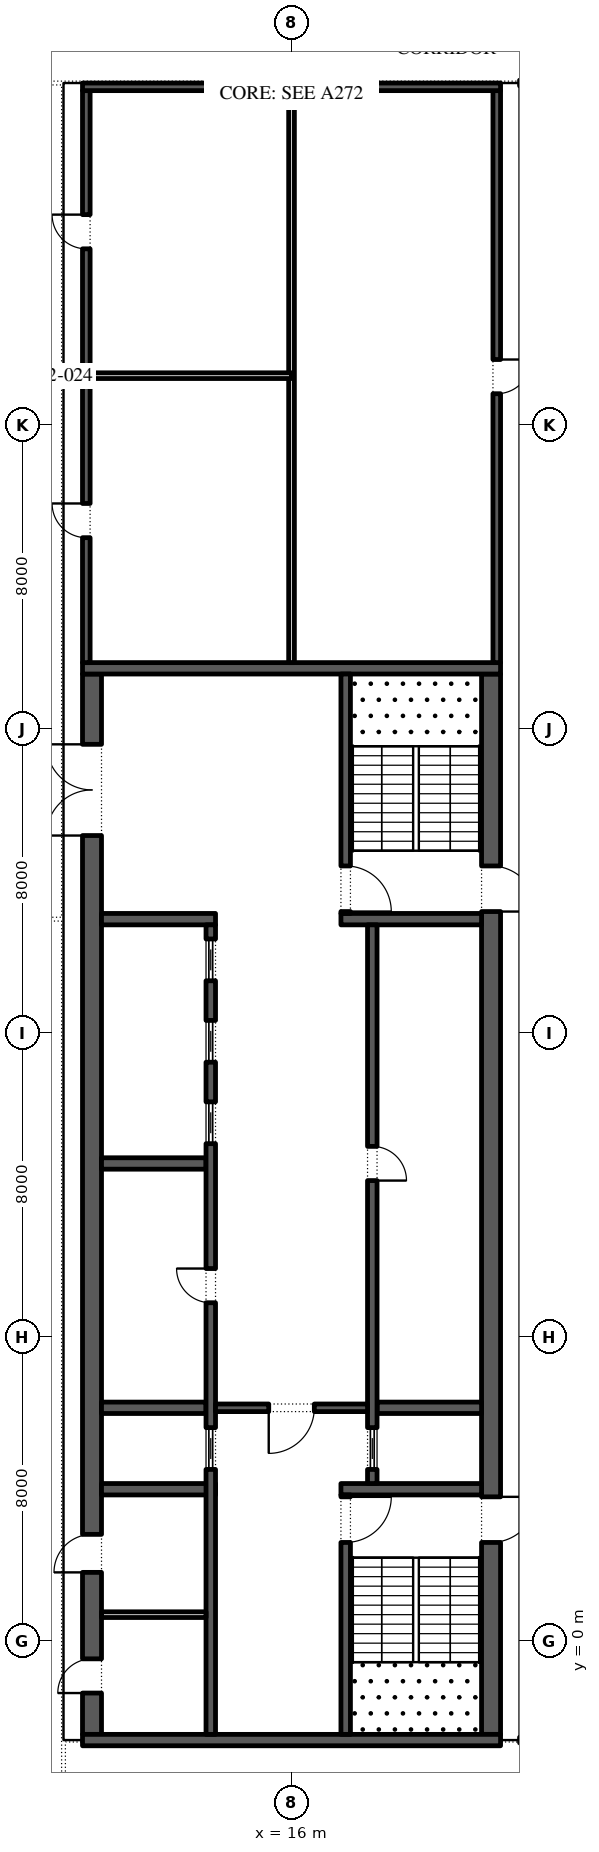
"""IFC4 building model, lengths in metres.
Left out: names, types, materials, properties, quantities, classifications, styles, units other than length and angle.
Written with IfcOpenShell. Run it as: python <this file> out.ifc"""

import sys

from ifc_helpers import new_model, si_unit, direction, frame, frame_2d, origin, place, context, subcontext, project, spatial, rectangle, extrude, element, fill, save


model = new_model("IFC4")
c1 = context("Model", 3, precision=1e-05, world=origin(), true_north=direction((0.0, 1.0)))
c2 = subcontext(c1, "Body", "Model", "MODEL_VIEW")
j1 = project(units=[si_unit("LENGTHUNIT", "METRE"), si_unit("PLANEANGLEUNIT", "RADIAN")], contexts=[c1])
p1 = place(None, origin())
s1 = spatial("IfcSite", under=j1, at=p1, CompositionType="ELEMENT")
p2 = place(p1, origin())
s2 = spatial("IfcBuilding", under=s1, at=p2, CompositionType="ELEMENT")
p3 = place(p2, frame((0.0, 0.0, 317.4)))
s3 = spatial("IfcBuildingStorey", under=s2, at=p3, CompositionType="ELEMENT", Elevation=317.4)
p4 = place(p3, frame((21.25, -2.45, 0.0), z_axis=(0.0, 0.0, 1.0), x_axis=(0.0, 1.0, 0.0)))
e1 = element("IfcWall", 1, at=p4, inside=s3, PredefinedType="SHEAR", context=c2, shape_type="SweptSolid", body=[
    extrude(rectangle(XDim=27.9, YDim=0.5, at=frame_2d((13.95, 0.0))), origin(), (0.0, 0.0, 1.0), 4.0),
])
p5 = place(p4, frame((5.05, 0.0, 0.0)))
e2 = element("IfcOpeningElement", 2, at=p5, cuts=e1, PredefinedType="OPENING", context=c2, shape_type="SweptSolid", body=[
    extrude(rectangle(XDim=1.2, YDim=2.1, at=frame_2d((0.6, 1.05))), frame((0.0, 0.26, 0.0), z_axis=(0.0, -1.0, 0.0), x_axis=(1.0, 0.0, 0.0)), (0.0, 0.0, 1.0), 0.52),
])
p6 = place(p4, frame((21.65, 0.0, 0.0)))
e3 = element("IfcOpeningElement", 3, at=p6, cuts=e1, PredefinedType="OPENING", context=c2, shape_type="SweptSolid", body=[
    extrude(rectangle(XDim=1.2, YDim=2.1, at=frame_2d((0.6, 1.05))), frame((0.0, 0.26, 0.0), z_axis=(0.0, -1.0, 0.0), x_axis=(1.0, 0.0, 0.0)), (0.0, 0.0, 1.0), 0.52),
])
p7 = place(p3, frame((10.75, -2.45, 0.0), z_axis=(0.0, 0.0, 1.0), x_axis=(0.0, 1.0, 0.0)))
e4 = element("IfcWall", 4, at=p7, inside=s3, PredefinedType="SHEAR", context=c2, shape_type="SweptSolid", body=[
    extrude(rectangle(XDim=27.9, YDim=0.5, at=frame_2d((13.95, 0.0))), origin(), (0.0, 0.0, 1.0), 4.0),
])
p8 = place(p7, frame((23.65, 0.0, 0.0)))
e5 = element("IfcOpeningElement", 5, at=p8, cuts=e4, PredefinedType="OPENING", context=c2, shape_type="SweptSolid", body=[
    extrude(rectangle(XDim=2.4, YDim=2.1, at=frame_2d((1.2, 1.05))), frame((0.0, 0.26, 0.0), z_axis=(0.0, -1.0, 0.0), x_axis=(1.0, 0.0, 0.0)), (0.0, 0.0, 1.0), 0.52),
])
p9 = place(p7, frame((1.087, 0.0, 0.0)))
e6 = element("IfcOpeningElement", 6, at=p9, cuts=e4, PredefinedType="OPENING", context=c2, shape_type="SweptSolid", body=[
    extrude(rectangle(XDim=0.9, YDim=2.1, at=frame_2d((0.45, 1.05))), frame((0.0, 0.26, 0.0), z_axis=(0.0, -1.0, 0.0), x_axis=(1.0, 0.0, 0.0)), (0.0, 0.0, 1.0), 0.52),
])
p10 = place(p7, frame((4.262, 0.0, 0.0)))
e7 = element("IfcOpeningElement", 7, at=p10, cuts=e4, PredefinedType="OPENING", context=c2, shape_type="SweptSolid", body=[
    extrude(rectangle(XDim=1.0, YDim=2.1, at=frame_2d((0.5, 1.05))), frame((0.0, 0.26, 0.0), z_axis=(0.0, -1.0, 0.0), x_axis=(1.0, 0.0, 0.0)), (0.0, 0.0, 1.0), 0.52),
])
for number, where, z_axis, x_axis in (
    (8, (10.5, -2.6, 0.0), (0.0, 0.0, 1.0), (1.0, 0.0, 0.0)),
    (9, (10.5, 25.6, 0.0), (0.0, 0.0, 1.0), (1.0, 0.0, 0.0)),
):
    element("IfcWall", number, at=place(p3, frame(where, z_axis=z_axis, x_axis=x_axis)), inside=s3, PredefinedType="SHEAR", context=c2, shape_type="SweptSolid", body=[
        extrude(rectangle(XDim=11.0, YDim=0.3, at=frame_2d((5.5, 0.0))), origin(), (0.0, 0.0, 1.0), 4.0),
    ])
p11 = place(p3, frame((17.3, 4.0, 0.0), z_axis=(0.0, 0.0, 1.0), x_axis=(1.0, 0.0, 0.0)))
e10 = element("IfcWall", 10, at=p11, inside=s3, PredefinedType="SHEAR", context=c2, shape_type="SweptSolid", body=[
    extrude(rectangle(XDim=3.7, YDim=0.3, at=frame_2d((1.85, 0.0))), origin(), (0.0, 0.0, 1.0), 4.0),
])
p12 = place(p3, frame((17.425, -2.45, 0.0), z_axis=(0.0, 0.0, 1.0), x_axis=(0.0, 1.0, 0.0)))
e11 = element("IfcWall", 11, at=p12, inside=s3, PredefinedType="SHEAR", context=c2, shape_type="SweptSolid", body=[
    extrude(rectangle(XDim=6.3, YDim=0.25, at=frame_2d((3.15, 0.0))), origin(), (0.0, 0.0, 1.0), 4.0),
])
p13 = place(p12, frame((5.05, 0.0, 0.0)))
e12 = element("IfcOpeningElement", 12, at=p13, cuts=e11, PredefinedType="OPENING", context=c2, shape_type="SweptSolid", body=[
    extrude(rectangle(XDim=1.2, YDim=2.1, at=frame_2d((0.6, 1.05))), frame((0.0, 0.135, 0.0), z_axis=(0.0, -1.0, 0.0), x_axis=(1.0, 0.0, 0.0)), (0.0, 0.0, 1.0), 0.27),
])
p14 = place(p3, frame((17.3, 19.0, 0.0), z_axis=(0.0, 0.0, 1.0), x_axis=(1.0, 0.0, 0.0)))
e13 = element("IfcWall", 13, at=p14, inside=s3, PredefinedType="SHEAR", context=c2, shape_type="SweptSolid", body=[
    extrude(rectangle(XDim=3.7, YDim=0.3, at=frame_2d((1.85, 0.0))), origin(), (0.0, 0.0, 1.0), 4.0),
])
p15 = place(p3, frame((17.425, 19.15, 0.0), z_axis=(0.0, 0.0, 1.0), x_axis=(0.0, 1.0, 0.0)))
e14 = element("IfcWall", 14, at=p15, inside=s3, PredefinedType="SHEAR", context=c2, shape_type="SweptSolid", body=[
    extrude(rectangle(XDim=6.3, YDim=0.25, at=frame_2d((3.15, 0.0))), origin(), (0.0, 0.0, 1.0), 4.0),
])
p16 = place(p15, frame((0.05, 0.0, 0.0)))
e15 = element("IfcOpeningElement", 15, at=p16, cuts=e14, PredefinedType="OPENING", context=c2, shape_type="SweptSolid", body=[
    extrude(rectangle(XDim=1.2, YDim=2.1, at=frame_2d((0.6, 1.05))), frame((0.0, 0.135, 0.0), z_axis=(0.0, -1.0, 0.0), x_axis=(1.0, 0.0, 0.0)), (0.0, 0.0, 1.0), 0.27),
])
p17 = place(p3, frame((18.25, 6.143, 0.0), z_axis=(0.0, 0.0, 1.0), x_axis=(1.0, 0.0, 0.0)))
e16 = element("IfcWall", 16, at=p17, inside=s3, PredefinedType="SHEAR", context=c2, shape_type="SweptSolid", body=[
    extrude(rectangle(XDim=2.75, YDim=0.3, at=frame_2d((1.375, 0.0))), origin(), (0.0, 0.0, 1.0), 4.0),
])
p18 = place(p3, frame((18.125, 4.15, 0.0), z_axis=(0.0, 0.0, 1.0), x_axis=(0.0, 1.0, 0.0)))
e17 = element("IfcWall", 17, at=p18, inside=s3, PredefinedType="SHEAR", context=c2, shape_type="SweptSolid", body=[
    extrude(rectangle(XDim=14.7, YDim=0.25, at=frame_2d((7.35, 0.0))), origin(), (0.0, 0.0, 1.0), 4.0),
])
p19 = place(p18, frame((7.971, 0.0, 0.0)))
e18 = element("IfcOpeningElement", 18, at=p19, cuts=e17, PredefinedType="OPENING", context=c2, shape_type="SweptSolid", body=[
    extrude(rectangle(XDim=0.9, YDim=2.1, at=frame_2d((0.45, 1.05))), frame((0.0, 0.135, 0.0), z_axis=(0.0, -1.0, 0.0), x_axis=(1.0, 0.0, 0.0)), (0.0, 0.0, 1.0), 0.27),
])
p20 = place(p18, frame((0.371, 0.0, 0.0)))
e19 = element("IfcOpeningElement", 19, at=p20, cuts=e17, PredefinedType="OPENING", context=c2, shape_type="SweptSolid", body=[
    extrude(rectangle(XDim=1.1, YDim=2.1, at=frame_2d((0.55, 1.05))), frame((0.0, 0.135, 0.0), z_axis=(0.0, -1.0, 0.0), x_axis=(1.0, 0.0, 0.0)), (0.0, 0.0, 1.0), 0.27),
])
p21 = place(p3, frame((11.0, 4.0, 0.0), z_axis=(0.0, 0.0, 1.0), x_axis=(1.0, 0.0, 0.0)))
e20 = element("IfcWall", 20, at=p21, inside=s3, PredefinedType="SHEAR", context=c2, shape_type="SweptSolid", body=[
    extrude(rectangle(XDim=3.0, YDim=0.3, at=frame_2d((1.5, 0.0))), origin(), (0.0, 0.0, 1.0), 4.0),
])
for number, where, z_axis, x_axis in (
    (21, (11.0, 6.143, 0.0), (0.0, 0.0, 1.0), (1.0, 0.0, 0.0)),
    (22, (11.0, 12.571, 0.0), (0.0, 0.0, 1.0), (1.0, 0.0, 0.0)),
):
    element("IfcWall", number, at=place(p3, frame(where, z_axis=z_axis, x_axis=x_axis)), inside=s3, PredefinedType="SHEAR", context=c2, shape_type="SweptSolid", body=[
        extrude(rectangle(XDim=2.75, YDim=0.3, at=frame_2d((1.375, 0.0))), origin(), (0.0, 0.0, 1.0), 4.0),
    ])
p22 = place(p3, frame((11.0, 19.0, 0.0), z_axis=(0.0, 0.0, 1.0), x_axis=(1.0, 0.0, 0.0)))
e23 = element("IfcWall", 23, at=p22, inside=s3, PredefinedType="SHEAR", context=c2, shape_type="SweptSolid", body=[
    extrude(rectangle(XDim=3.0, YDim=0.3, at=frame_2d((1.5, 0.0))), origin(), (0.0, 0.0, 1.0), 4.0),
])
p23 = place(p3, frame((13.875, -2.45, 0.0), z_axis=(0.0, 0.0, 1.0), x_axis=(0.0, 1.0, 0.0)))
e24 = element("IfcWall", 24, at=p23, inside=s3, PredefinedType="SHEAR", context=c2, shape_type="SweptSolid", body=[
    extrude(rectangle(XDim=21.3, YDim=0.25, at=frame_2d((10.65, 0.0))), origin(), (0.0, 0.0, 1.0), 4.0),
])
p24 = place(p23, frame((11.357, 0.0, 0.0)))
e25 = element("IfcOpeningElement", 25, at=p24, cuts=e24, PredefinedType="OPENING", context=c2, shape_type="SweptSolid", body=[
    extrude(rectangle(XDim=0.9, YDim=2.1, at=frame_2d((0.45, 1.05))), frame((0.0, 0.135, 0.0), z_axis=(0.0, -1.0, 0.0), x_axis=(1.0, 0.0, 0.0)), (0.0, 0.0, 1.0), 0.27),
])
p25 = place(p23, frame((6.971, 0.0, 0.0)))
e26 = element("IfcOpeningElement", 26, at=p25, cuts=e24, PredefinedType="OPENING", context=c2, shape_type="SweptSolid", body=[
    extrude(rectangle(XDim=1.1, YDim=2.1, at=frame_2d((0.55, 1.05))), frame((0.0, 0.135, 0.0), z_axis=(0.0, -1.0, 0.0), x_axis=(1.0, 0.0, 0.0)), (0.0, 0.0, 1.0), 0.27),
])
p26 = place(p23, frame((15.543, 0.0, 0.0)))
e27 = element("IfcOpeningElement", 27, at=p26, cuts=e24, PredefinedType="OPENING", context=c2, shape_type="SweptSolid", body=[
    extrude(rectangle(XDim=1.1, YDim=2.1, at=frame_2d((0.55, 1.05))), frame((0.0, 0.135, 0.0), z_axis=(0.0, -1.0, 0.0), x_axis=(1.0, 0.0, 0.0)), (0.0, 0.0, 1.0), 0.27),
])
p27 = place(p23, frame((17.686, 0.0, 0.0)))
e28 = element("IfcOpeningElement", 28, at=p27, cuts=e24, PredefinedType="OPENING", context=c2, shape_type="SweptSolid", body=[
    extrude(rectangle(XDim=1.1, YDim=2.1, at=frame_2d((0.55, 1.05))), frame((0.0, 0.135, 0.0), z_axis=(0.0, -1.0, 0.0), x_axis=(1.0, 0.0, 0.0)), (0.0, 0.0, 1.0), 0.27),
])
p28 = place(p23, frame((19.829, 0.0, 0.0)))
e29 = element("IfcOpeningElement", 29, at=p28, cuts=e24, PredefinedType="OPENING", context=c2, shape_type="SweptSolid", body=[
    extrude(rectangle(XDim=1.1, YDim=2.1, at=frame_2d((0.55, 1.05))), frame((0.0, 0.135, 0.0), z_axis=(0.0, -1.0, 0.0), x_axis=(1.0, 0.0, 0.0)), (0.0, 0.0, 1.0), 0.27),
])
p29 = place(p3, frame((14.0, 6.143, 0.0), z_axis=(0.0, 0.0, 1.0), x_axis=(1.0, 0.0, 0.0)))
e30 = element("IfcWall", 30, at=p29, inside=s3, PredefinedType="SHEAR", context=c2, shape_type="SweptSolid", body=[
    extrude(rectangle(XDim=4.0, YDim=0.2, at=frame_2d((2.0, 0.0))), origin(), (0.0, 0.0, 1.0), 4.0),
])
p30 = place(p29, frame((1.4, 0.0, 0.0)))
e31 = element("IfcOpeningElement", 31, at=p30, cuts=e30, PredefinedType="OPENING", context=c2, shape_type="SweptSolid", body=[
    extrude(rectangle(XDim=1.2, YDim=2.1, at=frame_2d((0.6, 1.05))), frame((0.0, 0.11, 0.0), z_axis=(0.0, -1.0, 0.0), x_axis=(1.0, 0.0, 0.0)), (0.0, 0.0, 1.0), 0.22),
])
p31 = place(p3, frame((11.0, 0.7, 0.0), z_axis=(0.0, 0.0, 1.0), x_axis=(1.0, 0.0, 0.0)))
e32 = element("IfcWall", 32, at=p31, inside=s3, PredefinedType="PARTITIONING", context=c2, shape_type="SweptSolid", body=[
    extrude(rectangle(XDim=2.75, YDim=0.15, at=frame_2d((1.375, 0.0))), origin(), (0.0, 0.0, 1.0), 4.0),
])
p32 = place(p3, frame((21.4, 25.75, 0.0), z_axis=(0.0, 0.0, 1.0), x_axis=(0.0, 1.0, 0.0)))
e33 = element("IfcWall", 33, at=p32, inside=s3, PredefinedType="SHEAR", context=c2, shape_type="SweptSolid", body=[
    extrude(rectangle(XDim=15.05, YDim=0.2, at=frame_2d((7.525, 0.0))), origin(), (0.0, 0.0, 1.0), 4.0),
])
p33 = place(p32, frame((7.075, 0.0, 0.0)))
e34 = element("IfcOpeningElement", 34, at=p33, cuts=e33, PredefinedType="OPENING", context=c2, shape_type="SweptSolid", body=[
    extrude(rectangle(XDim=0.9, YDim=2.1, at=frame_2d((0.45, 1.05))), frame((0.0, 0.11, 0.0), z_axis=(0.0, -1.0, 0.0), x_axis=(1.0, 0.0, 0.0)), (0.0, 0.0, 1.0), 0.22),
])
p34 = place(p3, frame((10.6, 25.75, 0.0), z_axis=(0.0, 0.0, 1.0), x_axis=(0.0, 1.0, 0.0)))
e35 = element("IfcWall", 35, at=p34, inside=s3, PredefinedType="SHEAR", context=c2, shape_type="SweptSolid", body=[
    extrude(rectangle(XDim=15.05, YDim=0.2, at=frame_2d((7.525, 0.0))), origin(), (0.0, 0.0, 1.0), 4.0),
])
p35 = place(p34, frame((3.288, 0.0, 0.0)))
e36 = element("IfcOpeningElement", 36, at=p35, cuts=e35, PredefinedType="OPENING", context=c2, shape_type="SweptSolid", body=[
    extrude(rectangle(XDim=0.9, YDim=2.1, at=frame_2d((0.45, 1.05))), frame((0.0, 0.11, 0.0), z_axis=(0.0, -1.0, 0.0), x_axis=(1.0, 0.0, 0.0)), (0.0, 0.0, 1.0), 0.22),
])
p36 = place(p34, frame((10.887, 0.0, 0.0)))
e37 = element("IfcOpeningElement", 37, at=p36, cuts=e35, PredefinedType="OPENING", context=c2, shape_type="SweptSolid", body=[
    extrude(rectangle(XDim=0.9, YDim=2.1, at=frame_2d((0.45, 1.05))), frame((0.0, 0.11, 0.0), z_axis=(0.0, -1.0, 0.0), x_axis=(1.0, 0.0, 0.0)), (0.0, 0.0, 1.0), 0.22),
])
p37 = place(p3, frame((10.5, 40.9, 0.0), z_axis=(0.0, 0.0, 1.0), x_axis=(1.0, 0.0, 0.0)))
e38 = element("IfcWall", 38, at=p37, inside=s3, PredefinedType="SHEAR", context=c2, shape_type="SweptSolid", body=[
    extrude(rectangle(XDim=11.0, YDim=0.2, at=frame_2d((5.5, 0.0))), origin(), (0.0, 0.0, 1.0), 4.0),
])
p38 = place(p3, frame((16.0, 25.75, 0.0), z_axis=(0.0, 0.0, 1.0), x_axis=(0.0, 1.0, 0.0)))
e39 = element("IfcWall", 39, at=p38, inside=s3, PredefinedType="PARTITIONING", context=c2, shape_type="SweptSolid", body=[
    extrude(rectangle(XDim=15.05, YDim=0.15, at=frame_2d((7.525, 0.0))), origin(), (0.0, 0.0, 1.0), 4.0),
])
p39 = place(p3, frame((10.7, 33.3, 0.0), z_axis=(0.0, 0.0, 1.0), x_axis=(1.0, 0.0, 0.0)))
e40 = element("IfcWall", 40, at=p39, inside=s3, PredefinedType="PARTITIONING", context=c2, shape_type="SweptSolid", body=[
    extrude(rectangle(XDim=5.3, YDim=0.15, at=frame_2d((2.65, 0.0))), origin(), (0.0, 0.0, 1.0), 4.0),
])
p40 = place(p19, frame((0.9, -0.2, 0.0), z_axis=(0.0, 0.0, 1.0), x_axis=(-1.0, 0.0, 0.0)))
e41 = element("IfcDoor", 41, at=p40, inside=s3, OperationType="SINGLE_SWING_LEFT", PredefinedType="DOOR", context=c2, shape_type="SweptSolid", body=[
    extrude(rectangle(XDim=0.9, YDim=2.1, at=frame_2d((0.45, 1.05))), frame((0.0, -0.075, 0.0), z_axis=(0.0, -1.0, 0.0), x_axis=(1.0, 0.0, 0.0)), (0.0, 0.0, 1.0), 0.05),
])
fill(e18, e41)
p41 = place(p20, origin())
e42 = element("IfcDoor", 42, at=p41, inside=s3, OperationType="SLIDING_TO_LEFT", PredefinedType="DOOR", context=c2, shape_type="SweptSolid", body=[
    extrude(rectangle(XDim=1.1, YDim=2.1, at=frame_2d((0.55, 1.05))), frame((0.0, 0.025, 0.0), z_axis=(0.0, -1.0, 0.0), x_axis=(1.0, 0.0, 0.0)), (0.0, 0.0, 1.0), 0.05),
])
fill(e19, e42)
p42 = place(p24, origin())
e43 = element("IfcDoor", 43, at=p42, inside=s3, OperationType="SINGLE_SWING_LEFT", PredefinedType="DOOR", context=c2, shape_type="SweptSolid", body=[
    extrude(rectangle(XDim=0.9, YDim=2.1, at=frame_2d((0.45, 1.05))), frame((0.0, 0.125, 0.0), z_axis=(0.0, -1.0, 0.0), x_axis=(1.0, 0.0, 0.0)), (0.0, 0.0, 1.0), 0.05),
])
fill(e25, e43)
p43 = place(p25, origin())
e44 = element("IfcDoor", 44, at=p43, inside=s3, OperationType="SLIDING_TO_LEFT", PredefinedType="DOOR", context=c2, shape_type="SweptSolid", body=[
    extrude(rectangle(XDim=1.1, YDim=2.1, at=frame_2d((0.55, 1.05))), frame((0.0, 0.025, 0.0), z_axis=(0.0, -1.0, 0.0), x_axis=(1.0, 0.0, 0.0)), (0.0, 0.0, 1.0), 0.05),
])
fill(e26, e44)
p44 = place(p26, origin())
e45 = element("IfcDoor", 45, at=p44, inside=s3, OperationType="SLIDING_TO_LEFT", PredefinedType="DOOR", context=c2, shape_type="SweptSolid", body=[
    extrude(rectangle(XDim=1.1, YDim=2.1, at=frame_2d((0.55, 1.05))), frame((0.0, 0.025, 0.0), z_axis=(0.0, -1.0, 0.0), x_axis=(1.0, 0.0, 0.0)), (0.0, 0.0, 1.0), 0.05),
])
fill(e27, e45)
p45 = place(p27, origin())
e46 = element("IfcDoor", 46, at=p45, inside=s3, OperationType="SLIDING_TO_LEFT", PredefinedType="DOOR", context=c2, shape_type="SweptSolid", body=[
    extrude(rectangle(XDim=1.1, YDim=2.1, at=frame_2d((0.55, 1.05))), frame((0.0, 0.025, 0.0), z_axis=(0.0, -1.0, 0.0), x_axis=(1.0, 0.0, 0.0)), (0.0, 0.0, 1.0), 0.05),
])
fill(e28, e46)
p46 = place(p28, origin())
e47 = element("IfcDoor", 47, at=p46, inside=s3, OperationType="SLIDING_TO_LEFT", PredefinedType="DOOR", context=c2, shape_type="SweptSolid", body=[
    extrude(rectangle(XDim=1.1, YDim=2.1, at=frame_2d((0.55, 1.05))), frame((0.0, 0.025, 0.0), z_axis=(0.0, -1.0, 0.0), x_axis=(1.0, 0.0, 0.0)), (0.0, 0.0, 1.0), 0.05),
])
fill(e29, e47)
p47 = place(p30, frame((1.2, 0.0, 0.0), z_axis=(0.0, 0.0, 1.0), x_axis=(-1.0, 0.0, 0.0)))
e48 = element("IfcDoor", 48, at=p47, inside=s3, OperationType="SINGLE_SWING_LEFT", PredefinedType="DOOR", context=c2, shape_type="SweptSolid", body=[
    extrude(rectangle(XDim=1.2, YDim=2.1, at=frame_2d((0.6, 1.05))), frame((0.0, 0.025, 0.0), z_axis=(0.0, -1.0, 0.0), x_axis=(1.0, 0.0, 0.0)), (0.0, 0.0, 1.0), 0.05),
])
fill(e31, e48)
p48 = place(p8, origin())
e49 = element("IfcDoor", 49, at=p48, inside=s3, OperationType="DOUBLE_DOOR_SINGLE_SWING", PredefinedType="DOOR", context=c2, shape_type="SweptSolid", body=[
    extrude(rectangle(XDim=2.4, YDim=2.1, at=frame_2d((1.2, 1.05))), frame((0.0, 0.025, 0.0), z_axis=(0.0, -1.0, 0.0), x_axis=(1.0, 0.0, 0.0)), (0.0, 0.0, 1.0), 0.05),
])
fill(e5, e49)
p49 = place(p13, frame((1.2, 0.0, 0.0), z_axis=(0.0, 0.0, 1.0), x_axis=(-1.0, 0.0, 0.0)))
e50 = element("IfcDoor", 50, at=p49, inside=s3, OperationType="SINGLE_SWING_RIGHT", PredefinedType="DOOR", context=c2, shape_type="SweptSolid", body=[
    extrude(rectangle(XDim=1.2, YDim=2.1, at=frame_2d((0.6, 1.05))), frame((0.0, 0.025, 0.0), z_axis=(0.0, -1.0, 0.0), x_axis=(1.0, 0.0, 0.0)), (0.0, 0.0, 1.0), 0.05),
])
fill(e12, e50)
p50 = place(p5, frame((1.2, 0.0, 0.0), z_axis=(0.0, 0.0, 1.0), x_axis=(-1.0, 0.0, 0.0)))
e51 = element("IfcDoor", 51, at=p50, inside=s3, OperationType="SINGLE_SWING_RIGHT", PredefinedType="DOOR", context=c2, shape_type="SweptSolid", body=[
    extrude(rectangle(XDim=1.2, YDim=2.1, at=frame_2d((0.6, 1.05))), frame((0.0, 0.025, 0.0), z_axis=(0.0, -1.0, 0.0), x_axis=(1.0, 0.0, 0.0)), (0.0, 0.0, 1.0), 0.05),
])
fill(e2, e51)
p51 = place(p16, frame((1.2, 0.0, 0.0), z_axis=(0.0, 0.0, 1.0), x_axis=(-1.0, 0.0, 0.0)))
e52 = element("IfcDoor", 52, at=p51, inside=s3, OperationType="SINGLE_SWING_LEFT", PredefinedType="DOOR", context=c2, shape_type="SweptSolid", body=[
    extrude(rectangle(XDim=1.2, YDim=2.1, at=frame_2d((0.6, 1.05))), frame((0.0, 0.025, 0.0), z_axis=(0.0, -1.0, 0.0), x_axis=(1.0, 0.0, 0.0)), (0.0, 0.0, 1.0), 0.05),
])
fill(e15, e52)
p52 = place(p6, frame((1.2, 0.0, 0.0), z_axis=(0.0, 0.0, 1.0), x_axis=(-1.0, 0.0, 0.0)))
e53 = element("IfcDoor", 53, at=p52, inside=s3, OperationType="SINGLE_SWING_LEFT", PredefinedType="DOOR", context=c2, shape_type="SweptSolid", body=[
    extrude(rectangle(XDim=1.2, YDim=2.1, at=frame_2d((0.6, 1.05))), frame((0.0, 0.025, 0.0), z_axis=(0.0, -1.0, 0.0), x_axis=(1.0, 0.0, 0.0)), (0.0, 0.0, 1.0), 0.05),
])
fill(e3, e53)
p53 = place(p9, origin())
e54 = element("IfcDoor", 54, at=p53, inside=s3, OperationType="SINGLE_SWING_RIGHT", PredefinedType="DOOR", context=c2, shape_type="SweptSolid", body=[
    extrude(rectangle(XDim=0.9, YDim=2.1, at=frame_2d((0.45, 1.05))), frame((0.0, -0.2, 0.0), z_axis=(0.0, -1.0, 0.0), x_axis=(1.0, 0.0, 0.0)), (0.0, 0.0, 1.0), 0.05),
])
fill(e6, e54)
p54 = place(p10, origin())
e55 = element("IfcDoor", 55, at=p54, inside=s3, OperationType="SINGLE_SWING_RIGHT", PredefinedType="DOOR", context=c2, shape_type="SweptSolid", body=[
    extrude(rectangle(XDim=1.0, YDim=2.1, at=frame_2d((0.5, 1.05))), frame((0.0, -0.2, 0.0), z_axis=(0.0, -1.0, 0.0), x_axis=(1.0, 0.0, 0.0)), (0.0, 0.0, 1.0), 0.05),
])
fill(e7, e55)
p55 = place(p33, frame((0.9, 0.15, 0.0), z_axis=(0.0, 0.0, 1.0), x_axis=(-1.0, 0.0, 0.0)))
e56 = element("IfcDoor", 56, at=p55, inside=s3, OperationType="SINGLE_SWING_RIGHT", PredefinedType="DOOR", context=c2, shape_type="SweptSolid", body=[
    extrude(rectangle(XDim=0.9, YDim=2.1, at=frame_2d((0.45, 1.05))), frame((0.0, 0.1, 0.0), z_axis=(0.0, -1.0, 0.0), x_axis=(1.0, 0.0, 0.0)), (0.0, 0.0, 1.0), 0.05),
])
fill(e34, e56)
p56 = place(p35, origin())
e57 = element("IfcDoor", 57, at=p56, inside=s3, OperationType="SINGLE_SWING_LEFT", PredefinedType="DOOR", context=c2, shape_type="SweptSolid", body=[
    extrude(rectangle(XDim=0.9, YDim=2.1, at=frame_2d((0.45, 1.05))), frame((0.0, -0.05, 0.0), z_axis=(0.0, -1.0, 0.0), x_axis=(1.0, 0.0, 0.0)), (0.0, 0.0, 1.0), 0.05),
])
fill(e36, e57)
p57 = place(p36, origin())
e58 = element("IfcDoor", 58, at=p57, inside=s3, OperationType="SINGLE_SWING_LEFT", PredefinedType="DOOR", context=c2, shape_type="SweptSolid", body=[
    extrude(rectangle(XDim=0.9, YDim=2.1, at=frame_2d((0.45, 1.05))), frame((0.0, -0.05, 0.0), z_axis=(0.0, -1.0, 0.0), x_axis=(1.0, 0.0, 0.0)), (0.0, 0.0, 1.0), 0.05),
])
fill(e37, e58)
save(model, sys.argv[1])
